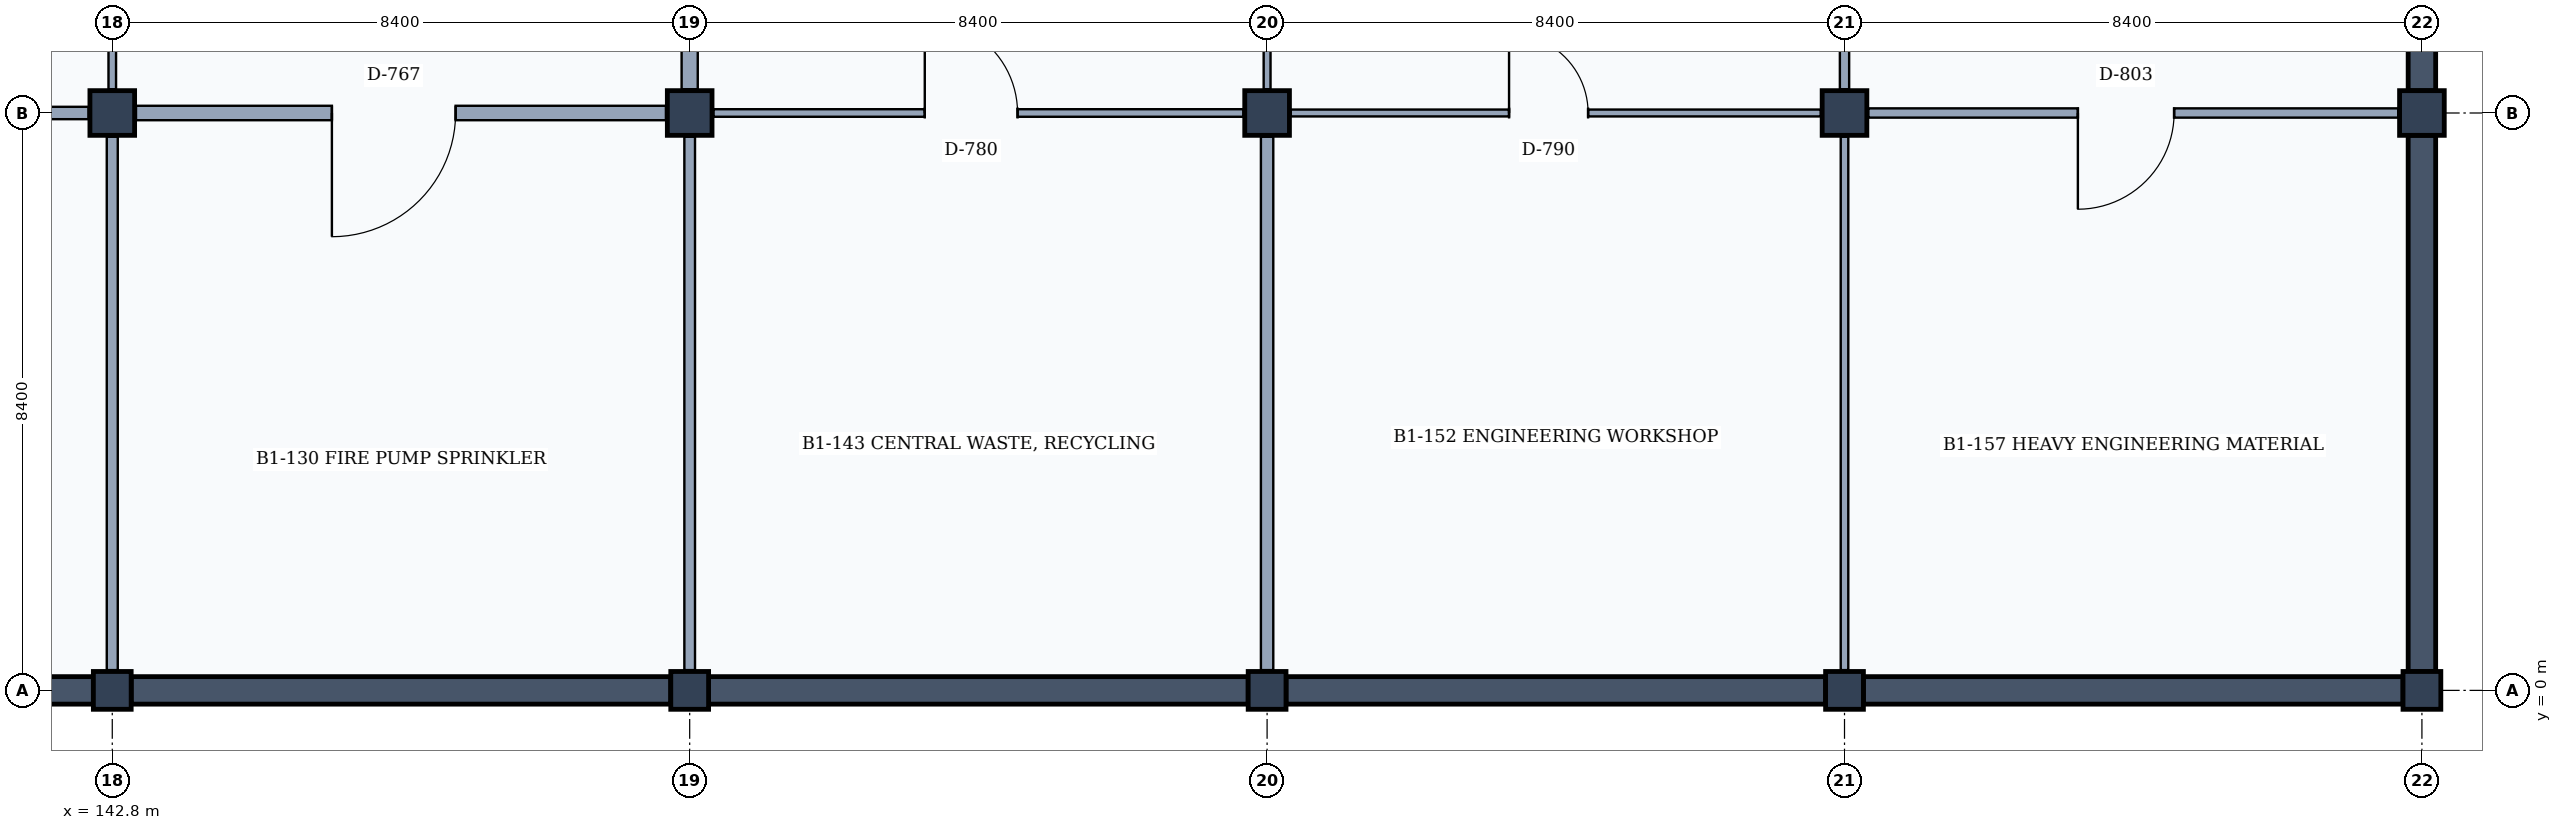
"""IFC4 building model, lengths in metres.
Left out: names, types, materials, properties, quantities, classifications, styles, units other than length and angle.
Written with IfcOpenShell. Run it as: python <this file> out.ifc"""

import sys

from ifc_helpers import new_model, si_unit, direction, frame, frame_2d, origin, origin_2d, place, context, subcontext, project, spatial, rectangle, extrude, element, fill, save


model = new_model("IFC4")
c1 = context("Model", 3, precision=1e-05, world=origin(), true_north=direction((0.0, 1.0)))
c2 = subcontext(c1, "Body", "Model", "MODEL_VIEW")
j1 = project(units=[si_unit("LENGTHUNIT", "METRE"), si_unit("PLANEANGLEUNIT", "RADIAN")], contexts=[c1])
p1 = place(None, origin())
s1 = spatial("IfcSite", under=j1, at=p1, CompositionType="ELEMENT")
p2 = place(p1, origin())
s2 = spatial("IfcBuilding", under=s1, at=p2, CompositionType="ELEMENT")
p3 = place(p2, frame((0.0, 0.0, -4.2)))
s3 = spatial("IfcBuildingStorey", under=s2, at=p3, CompositionType="ELEMENT", Elevation=-4.2)
p4 = place(p3, frame((142.8, 0.0, 0.0), z_axis=(0.0, 0.0, 1.0), x_axis=(1.0, 0.0, 0.0)))
e1 = element("IfcColumn", 1, at=p4, inside=s3, PredefinedType="COLUMN", context=c2, shape_type="SweptSolid", body=[
    extrude(rectangle(XDim=0.55, YDim=0.55, at=origin_2d()), origin(), (0.0, 0.0, 1.0), 4.2),
])
p5 = place(p3, frame((142.8, 8.4, 0.0), z_axis=(0.0, 0.0, 1.0), x_axis=(1.0, 0.0, 0.0)))
e2 = element("IfcColumn", 2, at=p5, inside=s3, PredefinedType="COLUMN", context=c2, shape_type="SweptSolid", body=[
    extrude(rectangle(XDim=0.65, YDim=0.65, at=origin_2d()), origin(), (0.0, 0.0, 1.0), 4.2),
])
p6 = place(p3, frame((151.2, 0.0, 0.0), z_axis=(0.0, 0.0, 1.0), x_axis=(1.0, 0.0, 0.0)))
e3 = element("IfcColumn", 3, at=p6, inside=s3, PredefinedType="COLUMN", context=c2, shape_type="SweptSolid", body=[
    extrude(rectangle(XDim=0.55, YDim=0.55, at=origin_2d()), origin(), (0.0, 0.0, 1.0), 4.2),
])
p7 = place(p3, frame((151.2, 8.4, 0.0), z_axis=(0.0, 0.0, 1.0), x_axis=(1.0, 0.0, 0.0)))
e4 = element("IfcColumn", 4, at=p7, inside=s3, PredefinedType="COLUMN", context=c2, shape_type="SweptSolid", body=[
    extrude(rectangle(XDim=0.65, YDim=0.65, at=origin_2d()), origin(), (0.0, 0.0, 1.0), 4.2),
])
p8 = place(p3, frame((159.6, 0.0, 0.0), z_axis=(0.0, 0.0, 1.0), x_axis=(1.0, 0.0, 0.0)))
e5 = element("IfcColumn", 5, at=p8, inside=s3, PredefinedType="COLUMN", context=c2, shape_type="SweptSolid", body=[
    extrude(rectangle(XDim=0.55, YDim=0.55, at=origin_2d()), origin(), (0.0, 0.0, 1.0), 4.2),
])
p9 = place(p3, frame((159.6, 8.4, 0.0), z_axis=(0.0, 0.0, 1.0), x_axis=(1.0, 0.0, 0.0)))
e6 = element("IfcColumn", 6, at=p9, inside=s3, PredefinedType="COLUMN", context=c2, shape_type="SweptSolid", body=[
    extrude(rectangle(XDim=0.65, YDim=0.65, at=origin_2d()), origin(), (0.0, 0.0, 1.0), 4.2),
])
p10 = place(p3, frame((168.0, 0.0, 0.0), z_axis=(0.0, 0.0, 1.0), x_axis=(1.0, 0.0, 0.0)))
e7 = element("IfcColumn", 7, at=p10, inside=s3, PredefinedType="COLUMN", context=c2, shape_type="SweptSolid", body=[
    extrude(rectangle(XDim=0.55, YDim=0.55, at=origin_2d()), origin(), (0.0, 0.0, 1.0), 4.2),
])
p11 = place(p3, frame((168.0, 8.4, 0.0), z_axis=(0.0, 0.0, 1.0), x_axis=(1.0, 0.0, 0.0)))
e8 = element("IfcColumn", 8, at=p11, inside=s3, PredefinedType="COLUMN", context=c2, shape_type="SweptSolid", body=[
    extrude(rectangle(XDim=0.65, YDim=0.65, at=origin_2d()), origin(), (0.0, 0.0, 1.0), 4.2),
])
p12 = place(p3, frame((176.4, 0.0, 0.0), z_axis=(0.0, 0.0, 1.0), x_axis=(1.0, 0.0, 0.0)))
e9 = element("IfcColumn", 9, at=p12, inside=s3, PredefinedType="COLUMN", context=c2, shape_type="SweptSolid", body=[
    extrude(rectangle(XDim=0.55, YDim=0.55, at=origin_2d()), origin(), (0.0, 0.0, 1.0), 4.2),
])
p13 = place(p3, frame((176.4, 8.4, 0.0), z_axis=(0.0, 0.0, 1.0), x_axis=(1.0, 0.0, 0.0)))
e10 = element("IfcColumn", 10, at=p13, inside=s3, PredefinedType="COLUMN", context=c2, shape_type="SweptSolid", body=[
    extrude(rectangle(XDim=0.65, YDim=0.65, at=origin_2d()), origin(), (0.0, 0.0, 1.0), 4.2),
])
p14 = place(p3, frame((142.525, 0.0, 0.0), z_axis=(0.0, 0.0, 1.0), x_axis=(-1.0, 0.0, 0.0)))
e11 = element("IfcWall", 11, at=p14, inside=s3, PredefinedType="STANDARD", context=c2, shape_type="SweptSolid", body=[
    extrude(rectangle(XDim=7.85, YDim=0.4, at=frame_2d((3.925, 0.0))), origin(), (0.0, 0.0, 1.0), 3.88),
])
p15 = place(p3, frame((150.925, 0.0, 0.0), z_axis=(0.0, 0.0, 1.0), x_axis=(-1.0, 0.0, 0.0)))
e12 = element("IfcWall", 12, at=p15, inside=s3, PredefinedType="STANDARD", context=c2, shape_type="SweptSolid", body=[
    extrude(rectangle(XDim=7.85, YDim=0.4, at=frame_2d((3.925, 0.0))), origin(), (0.0, 0.0, 1.0), 3.88),
])
p16 = place(p3, frame((159.325, 0.0, 0.0), z_axis=(0.0, 0.0, 1.0), x_axis=(-1.0, 0.0, 0.0)))
e13 = element("IfcWall", 13, at=p16, inside=s3, PredefinedType="STANDARD", context=c2, shape_type="SweptSolid", body=[
    extrude(rectangle(XDim=7.85, YDim=0.4, at=frame_2d((3.925, 0.0))), origin(), (0.0, 0.0, 1.0), 3.88),
])
for number, where, z_axis, x_axis in (
    (14, (167.725, 0.0, 0.0), (0.0, 0.0, 1.0), (-1.0, 0.0, 0.0)),
    (15, (176.125, 0.0, 0.0), (0.0, 0.0, 1.0), (-1.0, 0.0, 0.0)),
):
    element("IfcWall", number, at=place(p3, frame(where, z_axis=z_axis, x_axis=x_axis)), inside=s3, PredefinedType="STANDARD", context=c2, shape_type="SweptSolid", body=[
        extrude(rectangle(XDim=7.85, YDim=0.4, at=frame_2d((3.925, 0.0))), origin(), (0.0, 0.0, 1.0), 3.88),
    ])
p17 = place(p3, frame((176.4, 8.075, 0.0), z_axis=(0.0, 0.0, 1.0), x_axis=(0.0, -1.0, 0.0)))
e16 = element("IfcWall", 16, at=p17, inside=s3, PredefinedType="STANDARD", context=c2, shape_type="SweptSolid", body=[
    extrude(rectangle(XDim=7.8, YDim=0.4, at=frame_2d((3.9, 0.0))), origin(), (0.0, 0.0, 1.0), 3.88),
])
p18 = place(p3, frame((176.4, 16.475, 0.0), z_axis=(0.0, 0.0, 1.0), x_axis=(0.0, -1.0, 0.0)))
e17 = element("IfcWall", 17, at=p18, inside=s3, PredefinedType="STANDARD", context=c2, shape_type="SweptSolid", body=[
    extrude(rectangle(XDim=7.75, YDim=0.4, at=frame_2d((3.875, 0.0))), origin(), (0.0, 0.0, 1.0), 3.88),
])
p19 = place(p3, frame((142.8, 0.295, 0.0), z_axis=(0.0, 0.0, 1.0), x_axis=(0.0, 1.0, 0.0)))
e18 = element("IfcWall", 18, at=p19, inside=s3, PredefinedType="PARTITIONING", context=c2, shape_type="SweptSolid", body=[
    extrude(rectangle(XDim=7.76, YDim=0.16, at=frame_2d((3.88, 0.0))), origin(), (0.0, 0.0, 1.0), 3.1),
])
p20 = place(p3, frame((134.745, 8.4, 0.0), z_axis=(0.0, 0.0, 1.0), x_axis=(1.0, 0.0, 0.0)))
e19 = element("IfcWall", 19, at=p20, inside=s3, PredefinedType="PARTITIONING", context=c2, shape_type="SweptSolid", body=[
    extrude(rectangle(XDim=7.71, YDim=0.18, at=frame_2d((3.855, 0.0))), origin(), (0.0, 0.0, 1.0), 3.05),
])
p21 = place(p20, frame((2.925, 0.0, 0.0)))
e20 = element("IfcOpeningElement", 20, at=p21, cuts=e19, PredefinedType="OPENING", context=c2, shape_type="SweptSolid", body=[
    extrude(rectangle(XDim=1.65, YDim=2.25, at=frame_2d((0.825, 1.125))), frame((0.0, 0.1, 0.0), z_axis=(0.0, -1.0, 0.0), x_axis=(1.0, 0.0, 0.0)), (0.0, 0.0, 1.0), 0.2),
])
p22 = place(p3, frame((142.8, 8.745, 0.0), z_axis=(0.0, 0.0, 1.0), x_axis=(0.0, 1.0, 0.0)))
e21 = element("IfcWall", 21, at=p22, inside=s3, PredefinedType="PARTITIONING", context=c2, shape_type="SweptSolid", body=[
    extrude(rectangle(XDim=7.71, YDim=0.11, at=frame_2d((3.855, 0.0))), origin(), (0.0, 0.0, 1.0), 3.1),
])
p23 = place(p3, frame((151.2, 0.295, 0.0), z_axis=(0.0, 0.0, 1.0), x_axis=(0.0, 1.0, 0.0)))
e22 = element("IfcWall", 22, at=p23, inside=s3, PredefinedType="PARTITIONING", context=c2, shape_type="SweptSolid", body=[
    extrude(rectangle(XDim=7.76, YDim=0.155, at=frame_2d((3.88, 0.0))), origin(), (0.0, 0.0, 1.0), 3.1),
])
p24 = place(p3, frame((143.145, 8.4, 0.0), z_axis=(0.0, 0.0, 1.0), x_axis=(1.0, 0.0, 0.0)))
e23 = element("IfcWall", 23, at=p24, inside=s3, PredefinedType="PARTITIONING", context=c2, shape_type="SweptSolid", body=[
    extrude(rectangle(XDim=7.71, YDim=0.21, at=frame_2d((3.855, 0.0))), origin(), (0.0, 0.0, 1.0), 3.05),
])
p25 = place(p24, frame((2.85, 0.0, 0.0)))
e24 = element("IfcOpeningElement", 24, at=p25, cuts=e23, PredefinedType="OPENING", context=c2, shape_type="SweptSolid", body=[
    extrude(rectangle(XDim=1.8, YDim=2.3, at=frame_2d((0.9, 1.15))), frame((0.0, 0.115, 0.0), z_axis=(0.0, -1.0, 0.0), x_axis=(1.0, 0.0, 0.0)), (0.0, 0.0, 1.0), 0.23),
])
p26 = place(p3, frame((151.2, 8.745, 0.0), z_axis=(0.0, 0.0, 1.0), x_axis=(0.0, 1.0, 0.0)))
e25 = element("IfcWall", 25, at=p26, inside=s3, PredefinedType="PARTITIONING", context=c2, shape_type="SweptSolid", body=[
    extrude(rectangle(XDim=7.71, YDim=0.235, at=frame_2d((3.855, 0.0))), origin(), (0.0, 0.0, 1.0), 3.1),
])
p27 = place(p3, frame((159.6, 0.295, 0.0), z_axis=(0.0, 0.0, 1.0), x_axis=(0.0, 1.0, 0.0)))
e26 = element("IfcWall", 26, at=p27, inside=s3, PredefinedType="PARTITIONING", context=c2, shape_type="SweptSolid", body=[
    extrude(rectangle(XDim=7.76, YDim=0.18, at=frame_2d((3.88, 0.0))), origin(), (0.0, 0.0, 1.0), 3.1),
])
p28 = place(p3, frame((151.545, 8.4, 0.0), z_axis=(0.0, 0.0, 1.0), x_axis=(1.0, 0.0, 0.0)))
e27 = element("IfcWall", 27, at=p28, inside=s3, PredefinedType="PARTITIONING", context=c2, shape_type="SweptSolid", body=[
    extrude(rectangle(XDim=7.71, YDim=0.11, at=frame_2d((3.855, 0.0))), origin(), (0.0, 0.0, 1.0), 3.05),
])
p29 = place(p28, frame((3.075, 0.0, 0.0)))
e28 = element("IfcOpeningElement", 28, at=p29, cuts=e27, PredefinedType="OPENING", context=c2, shape_type="SweptSolid", body=[
    extrude(rectangle(XDim=1.35, YDim=2.25, at=frame_2d((0.675, 1.125))), frame((0.0, 0.065, 0.0), z_axis=(0.0, -1.0, 0.0), x_axis=(1.0, 0.0, 0.0)), (0.0, 0.0, 1.0), 0.13),
])
p30 = place(p3, frame((159.6, 8.745, 0.0), z_axis=(0.0, 0.0, 1.0), x_axis=(0.0, 1.0, 0.0)))
e29 = element("IfcWall", 29, at=p30, inside=s3, PredefinedType="MOVABLE", context=c2, shape_type="SweptSolid", body=[
    extrude(rectangle(XDim=7.71, YDim=0.1, at=frame_2d((3.855, 0.0))), origin(), (0.0, 0.0, 1.0), 3.1),
])
p31 = place(p3, frame((168.0, 0.295, 0.0), z_axis=(0.0, 0.0, 1.0), x_axis=(0.0, 1.0, 0.0)))
e30 = element("IfcWall", 30, at=p31, inside=s3, PredefinedType="PARTITIONING", context=c2, shape_type="SweptSolid", body=[
    extrude(rectangle(XDim=7.76, YDim=0.11, at=frame_2d((3.88, 0.0))), origin(), (0.0, 0.0, 1.0), 3.1),
])
p32 = place(p3, frame((159.945, 8.4, 0.0), z_axis=(0.0, 0.0, 1.0), x_axis=(1.0, 0.0, 0.0)))
e31 = element("IfcWall", 31, at=p32, inside=s3, PredefinedType="MOVABLE", context=c2, shape_type="SweptSolid", body=[
    extrude(rectangle(XDim=7.71, YDim=0.1, at=frame_2d((3.855, 0.0))), origin(), (0.0, 0.0, 1.0), 3.05),
])
p33 = place(p32, frame((3.175, 0.0, 0.0)))
e32 = element("IfcOpeningElement", 32, at=p33, cuts=e31, PredefinedType="OPENING", context=c2, shape_type="SweptSolid", body=[
    extrude(rectangle(XDim=1.15, YDim=2.25, at=frame_2d((0.575, 1.125))), frame((0.0, 0.06, 0.0), z_axis=(0.0, -1.0, 0.0), x_axis=(1.0, 0.0, 0.0)), (0.0, 0.0, 1.0), 0.12),
])
p34 = place(p3, frame((168.0, 8.745, 0.0), z_axis=(0.0, 0.0, 1.0), x_axis=(0.0, 1.0, 0.0)))
e33 = element("IfcWall", 33, at=p34, inside=s3, PredefinedType="PARTITIONING", context=c2, shape_type="SweptSolid", body=[
    extrude(rectangle(XDim=7.71, YDim=0.135, at=frame_2d((3.855, 0.0))), origin(), (0.0, 0.0, 1.0), 3.1),
])
p35 = place(p3, frame((168.345, 8.4, 0.0), z_axis=(0.0, 0.0, 1.0), x_axis=(1.0, 0.0, 0.0)))
e34 = element("IfcWall", 34, at=p35, inside=s3, PredefinedType="PARTITIONING", context=c2, shape_type="SweptSolid", body=[
    extrude(rectangle(XDim=7.71, YDim=0.135, at=frame_2d((3.855, 0.0))), origin(), (0.0, 0.0, 1.0), 3.05),
])
p36 = place(p35, frame((3.05, 0.0, 0.0)))
e35 = element("IfcOpeningElement", 35, at=p36, cuts=e34, PredefinedType="OPENING", context=c2, shape_type="SweptSolid", body=[
    extrude(rectangle(XDim=1.4, YDim=2.25, at=frame_2d((0.7, 1.125))), frame((0.0, 0.077, 0.0), z_axis=(0.0, -1.0, 0.0), x_axis=(1.0, 0.0, 0.0)), (0.0, 0.0, 1.0), 0.155),
])
p37 = place(p25, frame((1.8, 0.0, 0.0), z_axis=(0.0, 0.0, 1.0), x_axis=(-1.0, 0.0, 0.0)))
e36 = element("IfcDoor", 36, at=p37, inside=s3, OperationType="SINGLE_SWING_RIGHT", PredefinedType="DOOR", context=c2, shape_type="SweptSolid", body=[
    extrude(rectangle(XDim=1.8, YDim=2.3, at=frame_2d((0.9, 1.15))), frame((0.0, 0.025, 0.0), z_axis=(0.0, -1.0, 0.0), x_axis=(1.0, 0.0, 0.0)), (0.0, 0.0, 1.0), 0.05),
])
fill(e24, e36)
p38 = place(p29, origin())
e37 = element("IfcDoor", 37, at=p38, inside=s3, OperationType="SINGLE_SWING_LEFT", PredefinedType="DOOR", context=c2, shape_type="SweptSolid", body=[
    extrude(rectangle(XDim=1.35, YDim=2.25, at=frame_2d((0.675, 1.125))), frame((0.0, 0.025, 0.0), z_axis=(0.0, -1.0, 0.0), x_axis=(1.0, 0.0, 0.0)), (0.0, 0.0, 1.0), 0.05),
])
fill(e28, e37)
p39 = place(p33, origin())
e38 = element("IfcDoor", 38, at=p39, inside=s3, OperationType="SINGLE_SWING_LEFT", PredefinedType="DOOR", context=c2, shape_type="SweptSolid", body=[
    extrude(rectangle(XDim=1.15, YDim=2.25, at=frame_2d((0.575, 1.125))), frame((0.0, 0.025, 0.0), z_axis=(0.0, -1.0, 0.0), x_axis=(1.0, 0.0, 0.0)), (0.0, 0.0, 1.0), 0.05),
])
fill(e32, e38)
p40 = place(p36, frame((1.4, 0.0, 0.0), z_axis=(0.0, 0.0, 1.0), x_axis=(-1.0, 0.0, 0.0)))
e39 = element("IfcDoor", 39, at=p40, inside=s3, OperationType="SINGLE_SWING_RIGHT", PredefinedType="DOOR", context=c2, shape_type="SweptSolid", body=[
    extrude(rectangle(XDim=1.4, YDim=2.25, at=frame_2d((0.7, 1.125))), frame((0.0, 0.025, 0.0), z_axis=(0.0, -1.0, 0.0), x_axis=(1.0, 0.0, 0.0)), (0.0, 0.0, 1.0), 0.05),
])
fill(e35, e39)
save(model, sys.argv[1])
